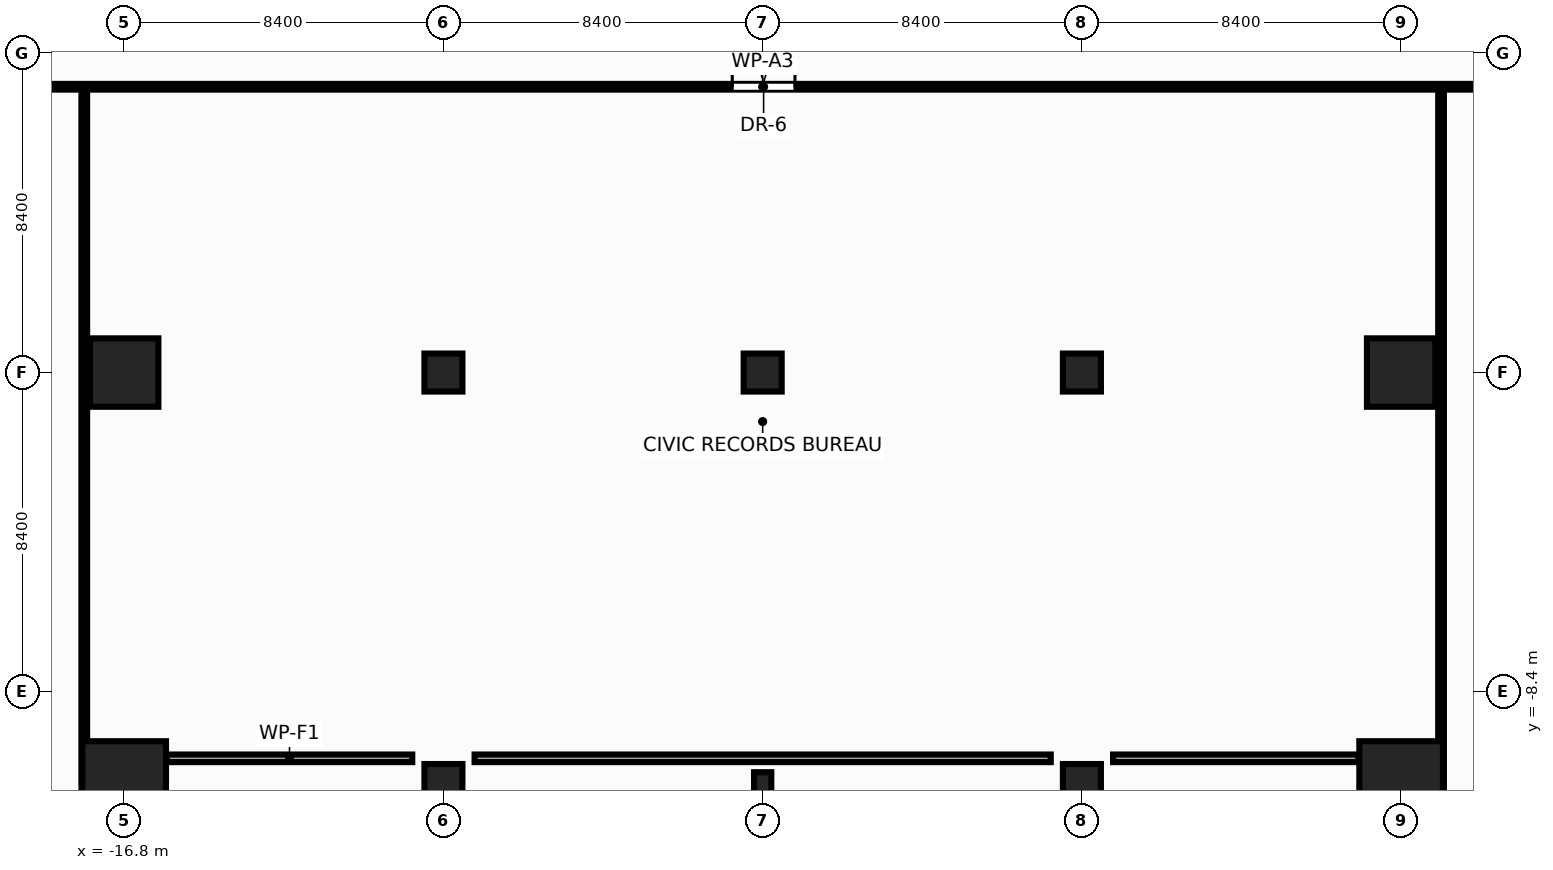
"""IFC4 building model, lengths in metres.
Left out: names, types, materials, properties, quantities, classifications, styles, units other than length and angle.
Written with IfcOpenShell. Run it as: python <this file> out.ifc"""

import sys

from ifc_helpers import new_model, si_unit, direction, frame, frame_2d, origin, origin_with_axes, origin_2d, place, context, subcontext, project, spatial, rectangle, hollow_rectangle, i_section, extrude, source, transform, mapped, element, fill, save


model = new_model("IFC4")
c1 = context("Model", 3, precision=1e-05, world=origin(), true_north=direction((0.0, 1.0)))
c2 = subcontext(c1, "Body", "Model", "MODEL_VIEW")
j1 = project(units=[si_unit("LENGTHUNIT", "METRE"), si_unit("PLANEANGLEUNIT", "RADIAN")], contexts=[c1])
p1 = place(None, origin())
s1 = spatial("IfcSite", under=j1, at=p1, CompositionType="ELEMENT")
p2 = place(p1, origin())
s2 = spatial("IfcBuilding", under=s1, at=p2, CompositionType="ELEMENT")
p3 = place(p2, frame((0.0, 0.0, 18.95)))
s3 = spatial("IfcBuildingStorey", under=s2, at=p3, CompositionType="ELEMENT", Elevation=18.95)
m1 = source(origin(), c2, "Body", "SweptSolid", [
    extrude(rectangle(XDim=2.2, YDim=2.2, at=origin_2d()), origin(), (0.0, 0.0, 1.0), 4.65),
])
p4 = place(p3, frame((-16.8, -10.8, 0.0), z_axis=(0.0, 0.0, 1.0), x_axis=(1.0, 0.0, 0.0)))
e1 = element("IfcColumn", 1, at=p4, inside=s3, PredefinedType="COLUMN", context=c2, shape_type="MappedRepresentation", body=[
    mapped(m1, transform((0.0, 0.0, 0.0), x_axis=(1.0, 0.0, 0.0), y_axis=(0.0, 1.0, 0.0), z_axis=(0.0, 0.0, 1.0), scale=1.0)),
])
m2 = source(origin(), c2, "Body", "SweptSolid", [
    extrude(rectangle(XDim=1.8, YDim=1.8, at=origin_2d()), origin(), (0.0, 0.0, 1.0), 4.65),
])
p5 = place(p3, frame((-16.8, 0.0, 0.0), z_axis=(0.0, 0.0, 1.0), x_axis=(1.0, 0.0, 0.0)))
e2 = element("IfcColumn", 2, at=p5, inside=s3, PredefinedType="COLUMN", context=c2, shape_type="MappedRepresentation", body=[
    mapped(m2, transform((0.0, 0.0, 0.0), x_axis=(1.0, 0.0, 0.0), y_axis=(0.0, 1.0, 0.0), z_axis=(0.0, 0.0, 1.0), scale=1.0)),
])
p6 = place(p3, frame((16.8, -10.8, 0.0), z_axis=(0.0, 0.0, 1.0), x_axis=(1.0, 0.0, 0.0)))
e3 = element("IfcColumn", 3, at=p6, inside=s3, PredefinedType="COLUMN", context=c2, shape_type="MappedRepresentation", body=[
    mapped(m1, transform((0.0, 0.0, 0.0), x_axis=(1.0, 0.0, 0.0), y_axis=(0.0, 1.0, 0.0), z_axis=(0.0, 0.0, 1.0), scale=1.0)),
])
p7 = place(p3, frame((16.8, 0.0, 0.0), z_axis=(0.0, 0.0, 1.0), x_axis=(1.0, 0.0, 0.0)))
e4 = element("IfcColumn", 4, at=p7, inside=s3, PredefinedType="COLUMN", context=c2, shape_type="MappedRepresentation", body=[
    mapped(m2, transform((0.0, 0.0, 0.0), x_axis=(1.0, 0.0, 0.0), y_axis=(0.0, 1.0, 0.0), z_axis=(0.0, 0.0, 1.0), scale=1.0)),
])
m3 = source(origin(), c2, "Body", "SweptSolid", [
    extrude(hollow_rectangle(XDim=1.0, YDim=1.0, WallThickness=0.045, at=origin_2d()), origin(), (0.0, 0.0, 1.0), 4.65),
])
for number, where, z_axis, x_axis in (
    (5, (-8.4, 0.0, 0.0), (0.0, 0.0, 1.0), (1.0, 0.0, 0.0)),
    (6, (-8.4, -10.8, 0.0), (0.0, 0.0, 1.0), (1.0, 0.0, 0.0)),
    (7, (8.4, 0.0, 0.0), (0.0, 0.0, 1.0), (1.0, 0.0, 0.0)),
    (8, (8.4, -10.8, 0.0), (0.0, 0.0, 1.0), (1.0, 0.0, 0.0)),
):
    element("IfcColumn", number, at=place(p3, frame(where, z_axis=z_axis, x_axis=x_axis)), inside=s3, PredefinedType="COLUMN", context=c2, shape_type="MappedRepresentation", body=[
        mapped(m3, transform((0.0, 0.0, 0.0), x_axis=(1.0, 0.0, 0.0), y_axis=(0.0, 1.0, 0.0), z_axis=(0.0, 0.0, 1.0), scale=1.0)),
    ])
m4 = source(origin(), c2, "Body", "SweptSolid", [
    extrude(i_section(OverallWidth=0.454, OverallDepth=0.569, WebThickness=0.045, FlangeThickness=0.064, at=origin_2d()), origin(), (0.0, 0.0, 1.0), 4.97),
])
p8 = place(p3, frame((0.0, -10.8, -0.32), z_axis=(0.0, 0.0, 1.0), x_axis=(1.0, 0.0, 0.0)))
e9 = element("IfcColumn", 9, at=p8, inside=s3, PredefinedType="COLUMN", context=c2, shape_type="MappedRepresentation", body=[
    mapped(m4, transform((0.0, 0.0, 0.0), x_axis=(1.0, 0.0, 0.0), y_axis=(0.0, 1.0, 0.0), z_axis=(0.0, 0.0, 1.0), scale=1.0)),
])
m5 = source(origin(), c2, "Body", "SweptSolid", [
    extrude(rectangle(XDim=1.0, YDim=1.0, at=origin_2d()), origin(), (0.0, 0.0, 1.0), 4.65),
])
p9 = place(p3, origin_with_axes())
e10 = element("IfcColumn", 10, at=p9, inside=s3, PredefinedType="COLUMN", context=c2, shape_type="MappedRepresentation", body=[
    mapped(m5, transform((0.0, 0.0, 0.0), x_axis=(1.0, 0.0, 0.0), y_axis=(0.0, 1.0, 0.0), z_axis=(0.0, 0.0, 1.0), scale=1.0)),
])
m6 = source(origin(), c2, "Body", "SweptSolid", [
    extrude(rectangle(XDim=57.0, YDim=0.15, at=frame_2d((28.5, 0.0))), origin(), (0.0, 0.0, 1.0), 3.795),
])
p10 = place(p3, frame((-28.5, 7.52, 0.0), z_axis=(0.0, 0.0, 1.0), x_axis=(1.0, 0.0, 0.0)))
e11 = element("IfcWall", 11, at=p10, inside=s3, PredefinedType="PARTITIONING", context=c2, shape_type="MappedRepresentation", body=[
    mapped(m6, transform((0.0, 0.0, 0.0), x_axis=(1.0, 0.0, 0.0), y_axis=(0.0, 1.0, 0.0), z_axis=(0.0, 0.0, 1.0), scale=1.0)),
])
p11 = place(p10, frame((6.0, 0.0, 0.0)))
e12 = element("IfcOpeningElement", 12, at=p11, cuts=e11, PredefinedType="OPENING", context=c2, shape_type="SweptSolid", body=[
    extrude(rectangle(XDim=1.04, YDim=2.2, at=frame_2d((0.52, 1.1))), frame((0.0, 0.087, 0.0), z_axis=(0.0, -1.0, 0.0), x_axis=(1.0, 0.0, 0.0)), (0.0, 0.0, 1.0), 0.174),
])
p12 = place(p10, frame((27.7, 0.0, 0.0)))
e13 = element("IfcOpeningElement", 13, at=p12, cuts=e11, PredefinedType="OPENING", context=c2, shape_type="SweptSolid", body=[
    extrude(rectangle(XDim=1.65, YDim=2.35, at=frame_2d((0.825, 1.175))), frame((0.0, 0.087, 0.0), z_axis=(0.0, -1.0, 0.0), x_axis=(1.0, 0.0, 0.0)), (0.0, 0.0, 1.0), 0.174),
])
p13 = place(p10, frame((49.5, 0.0, 0.0)))
e14 = element("IfcOpeningElement", 14, at=p13, cuts=e11, PredefinedType="OPENING", context=c2, shape_type="SweptSolid", body=[
    extrude(rectangle(XDim=1.04, YDim=2.2, at=frame_2d((0.52, 1.1))), frame((0.0, 0.087, 0.0), z_axis=(0.0, -1.0, 0.0), x_axis=(1.0, 0.0, 0.0)), (0.0, 0.0, 1.0), 0.174),
])
m7 = source(origin(), c2, "Body", "SweptSolid", [
    extrude(rectangle(XDim=33.88, YDim=0.15, at=frame_2d((16.94, 0.0))), origin(), (0.0, 0.0, 1.0), 3.795),
])
p14 = place(p3, frame((-17.85, -26.5, 0.0), z_axis=(0.0, 0.0, 1.0), x_axis=(0.0, 1.0, 0.0)))
e15 = element("IfcWall", 15, at=p14, inside=s3, PredefinedType="PARTITIONING", context=c2, shape_type="MappedRepresentation", body=[
    mapped(m7, transform((0.0, 0.0, 0.0), x_axis=(1.0, 0.0, 0.0), y_axis=(0.0, 1.0, 0.0), z_axis=(0.0, 0.0, 1.0), scale=1.0)),
])
p15 = place(p14, frame((11.6, 0.0, 0.0)))
e16 = element("IfcOpeningElement", 16, at=p15, cuts=e15, PredefinedType="OPENING", context=c2, shape_type="SweptSolid", body=[
    extrude(rectangle(XDim=1.04, YDim=2.2, at=frame_2d((0.52, 1.1))), frame((0.0, 0.087, 0.0), z_axis=(0.0, -1.0, 0.0), x_axis=(1.0, 0.0, 0.0)), (0.0, 0.0, 1.0), 0.174),
])
p16 = place(p14, frame((3.5, 0.0, 0.0)))
e17 = element("IfcOpeningElement", 17, at=p16, cuts=e15, PredefinedType="OPENING", context=c2, shape_type="SweptSolid", body=[
    extrude(rectangle(XDim=1.04, YDim=2.2, at=frame_2d((0.52, 1.1))), frame((0.0, 0.087, 0.0), z_axis=(0.0, -1.0, 0.0), x_axis=(1.0, 0.0, 0.0)), (0.0, 0.0, 1.0), 0.174),
])
p17 = place(p3, frame((17.85, -26.5, 0.0), z_axis=(0.0, 0.0, 1.0), x_axis=(0.0, 1.0, 0.0)))
e18 = element("IfcWall", 18, at=p17, inside=s3, PredefinedType="PARTITIONING", context=c2, shape_type="MappedRepresentation", body=[
    mapped(m7, transform((0.0, 0.0, 0.0), x_axis=(1.0, 0.0, 0.0), y_axis=(0.0, 1.0, 0.0), z_axis=(0.0, 0.0, 1.0), scale=1.0)),
])
m8 = source(origin(), c2, "Body", "SweptSolid", [
    extrude(rectangle(XDim=6.46, YDim=0.2, at=frame_2d((3.23, 0.0))), origin(), (0.0, 0.0, 1.0), 4.41),
])
p18 = place(p3, frame((-15.68, -10.15, 0.0), z_axis=(0.0, 0.0, 1.0), x_axis=(1.0, 0.0, 0.0)))
e19 = element("IfcWall", 19, at=p18, inside=s3, PredefinedType="PARTITIONING", context=c2, shape_type="MappedRepresentation", body=[
    mapped(m8, transform((0.0, 0.0, 0.0), x_axis=(1.0, 0.0, 0.0), y_axis=(0.0, 1.0, 0.0), z_axis=(0.0, 0.0, 1.0), scale=1.0)),
])
m9 = source(origin(), c2, "Body", "SweptSolid", [
    extrude(rectangle(XDim=15.16, YDim=0.2, at=frame_2d((7.58, 0.0))), origin(), (0.0, 0.0, 1.0), 3.795),
])
p19 = place(p3, frame((-7.58, -10.15, 0.0), z_axis=(0.0, 0.0, 1.0), x_axis=(1.0, 0.0, 0.0)))
e20 = element("IfcWall", 20, at=p19, inside=s3, PredefinedType="PARTITIONING", context=c2, shape_type="MappedRepresentation", body=[
    mapped(m9, transform((0.0, 0.0, 0.0), x_axis=(1.0, 0.0, 0.0), y_axis=(0.0, 1.0, 0.0), z_axis=(0.0, 0.0, 1.0), scale=1.0)),
])
p20 = place(p3, frame((9.22, -10.15, 0.0), z_axis=(0.0, 0.0, 1.0), x_axis=(1.0, 0.0, 0.0)))
e21 = element("IfcWall", 21, at=p20, inside=s3, PredefinedType="PARTITIONING", context=c2, shape_type="MappedRepresentation", body=[
    mapped(m8, transform((0.0, 0.0, 0.0), x_axis=(1.0, 0.0, 0.0), y_axis=(0.0, 1.0, 0.0), z_axis=(0.0, 0.0, 1.0), scale=1.0)),
])
m10 = source(origin(), c2, "Body", "SweptSolid", [
    extrude(rectangle(XDim=1.65, YDim=2.35, at=frame_2d((0.825, 1.175))), frame((0.0, 0.025, 0.0), z_axis=(0.0, -1.0, 0.0), x_axis=(1.0, 0.0, 0.0)), (0.0, 0.0, 1.0), 0.05),
])
p21 = place(p12, origin())
e22 = element("IfcDoor", 22, at=p21, inside=s3, OperationType="DOUBLE_DOOR_SINGLE_SWING", PredefinedType="DOOR", context=c2, shape_type="MappedRepresentation", body=[
    mapped(m10, transform((0.0, 0.0, 0.0), x_axis=(1.0, 0.0, 0.0), y_axis=(0.0, 1.0, 0.0), z_axis=(0.0, 0.0, 1.0), scale=1.0)),
])
fill(e13, e22)
save(model, sys.argv[1])
